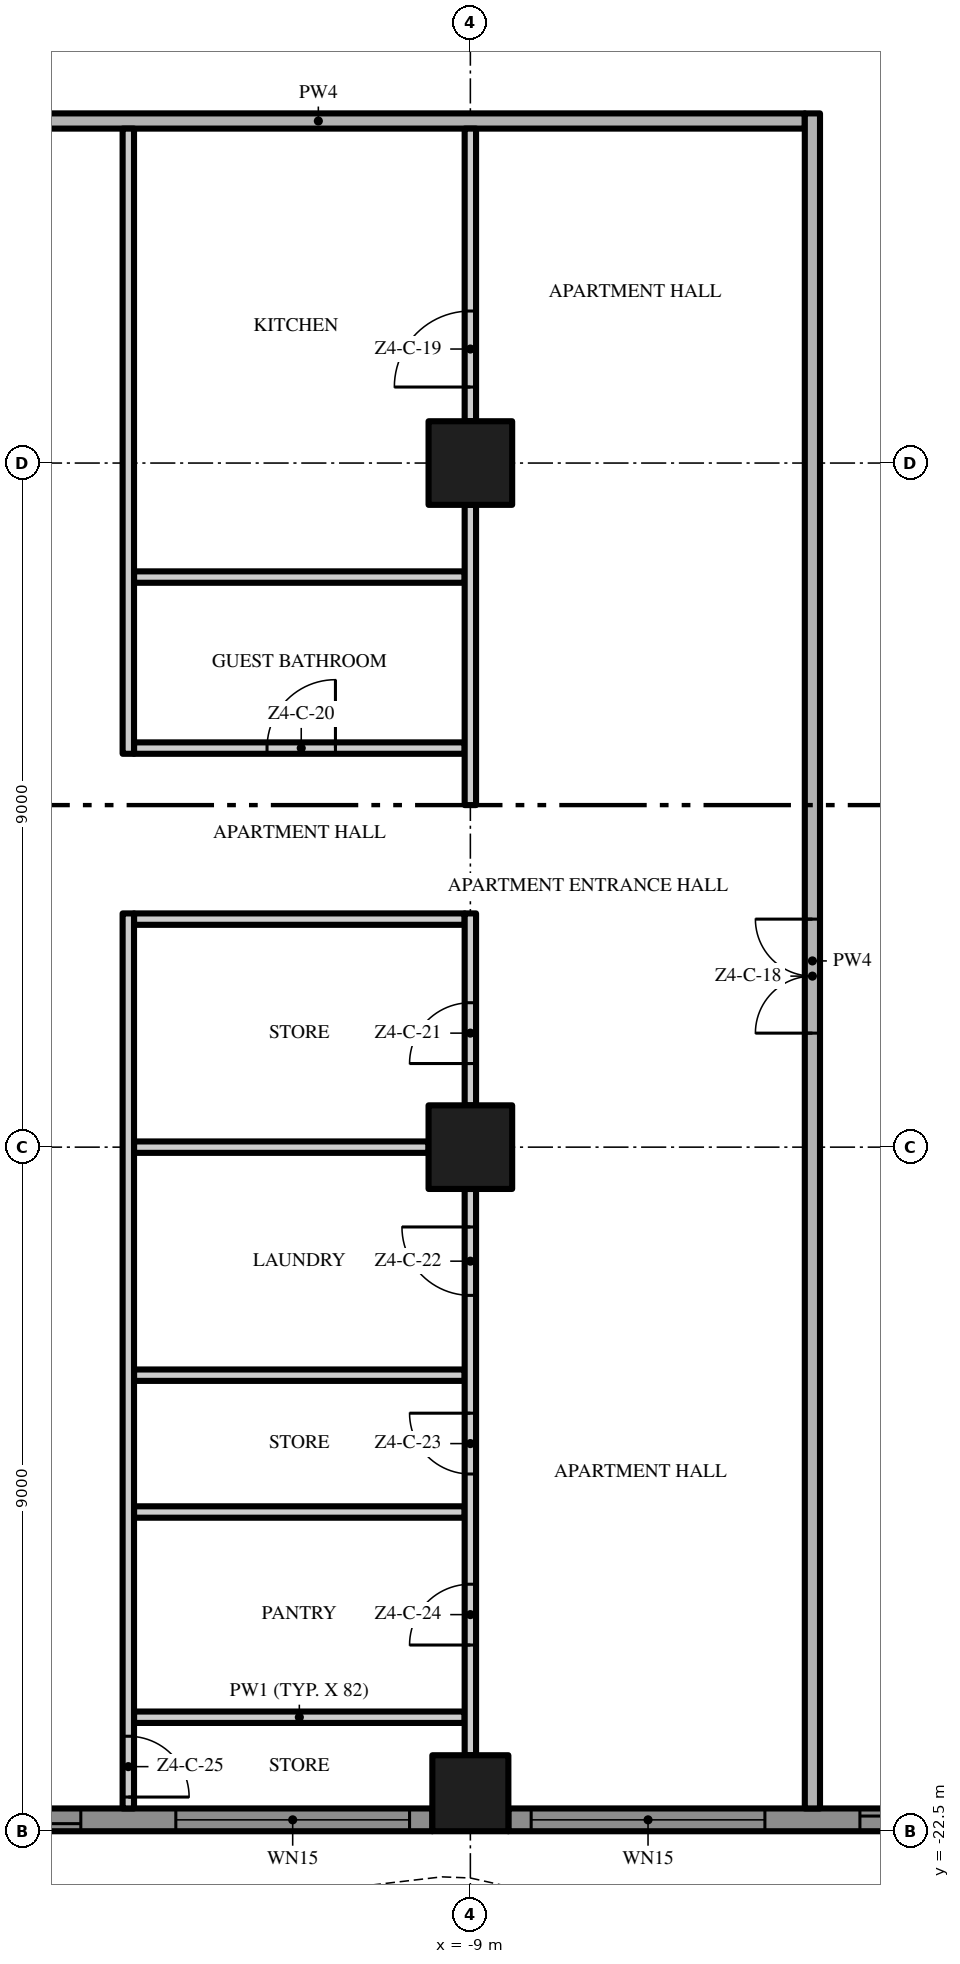
"""IFC4 building model, lengths in metres.
Left out: names, types, materials, properties, quantities, classifications, styles, units other than length and angle.
Written with IfcOpenShell. Run it as: python <this file> out.ifc"""

import sys

from ifc_helpers import new_model, si_unit, direction, frame, frame_2d, origin, origin_2d, place, context, subcontext, project, spatial, polyline, rectangle, outline, extrude, element, fill, save


model = new_model("IFC4")
c1 = context("Model", 3, precision=1e-05, world=origin(), true_north=direction((0.0, 1.0)))
c2 = subcontext(c1, "Body", "Model", "MODEL_VIEW")
j1 = project(units=[si_unit("LENGTHUNIT", "METRE"), si_unit("PLANEANGLEUNIT", "RADIAN")], contexts=[c1])
p1 = place(None, origin())
s1 = spatial("IfcSite", under=j1, at=p1, CompositionType="ELEMENT")
p2 = place(p1, origin())
s2 = spatial("IfcBuilding", under=s1, at=p2, CompositionType="ELEMENT")
p3 = place(p2, frame((0.0, 0.0, 207.2)))
s3 = spatial("IfcBuildingStorey", under=s2, at=p3, CompositionType="ELEMENT", Elevation=207.2)
p4 = place(p3, frame((-9.0, -13.5, 0.0), z_axis=(0.0, 0.0, 1.0), x_axis=(1.0, 0.0, 0.0)))
e1 = element("IfcColumn", 1, at=p4, inside=s3, PredefinedType="COLUMN", context=c2, shape_type="SweptSolid", body=[
    extrude(rectangle(XDim=1.1, YDim=1.1, at=origin_2d()), origin(), (0.0, 0.0, 1.0), 3.5),
])
p5 = place(p3, frame((-9.0, -22.0, 0.0), z_axis=(0.0, 0.0, 1.0), x_axis=(1.0, 0.0, 0.0)))
e2 = element("IfcColumn", 2, at=p5, inside=s3, PredefinedType="COLUMN", context=c2, shape_type="SweptSolid", body=[
    extrude(rectangle(XDim=1.0, YDim=1.0, at=origin_2d()), origin(), (0.0, 0.0, 1.0), 3.5),
])
p6 = place(p3, frame((-9.0, -4.5, 0.0), z_axis=(0.0, 0.0, 1.0), x_axis=(1.0, 0.0, 0.0)))
e3 = element("IfcColumn", 3, at=p6, inside=s3, PredefinedType="COLUMN", context=c2, shape_type="SweptSolid", body=[
    extrude(rectangle(XDim=1.1, YDim=1.1, at=origin_2d()), origin(), (0.0, 0.0, 1.0), 3.5),
])
p7 = place(p3, frame((-9.5, -22.35, 0.0), z_axis=(0.0, 0.0, 1.0), x_axis=(-1.0, 0.0, 0.0)))
e4 = element("IfcWall", 4, at=p7, inside=s3, PredefinedType="SOLIDWALL", context=c2, shape_type="SweptSolid", body=[
    extrude(rectangle(XDim=8.0, YDim=0.3, at=frame_2d((4.0, 0.0))), origin(), (0.0, 0.0, 1.0), 3.5),
])
p8 = place(p7, frame((4.625, 0.0, 0.0)))
e5 = element("IfcOpeningElement", 5, at=p8, cuts=e4, PredefinedType="OPENING", context=c2, shape_type="SweptSolid", body=[
    extrude(rectangle(XDim=3.075, YDim=2.4, at=frame_2d((1.538, 1.2))), frame((0.0, 0.16, 0.0), z_axis=(0.0, -1.0, 0.0), x_axis=(1.0, 0.0, 0.0)), (0.0, 0.0, 1.0), 0.32),
])
p9 = place(p7, frame((0.3, 0.0, 0.45)))
e6 = element("IfcOpeningElement", 6, at=p9, cuts=e4, PredefinedType="OPENING", context=c2, shape_type="SweptSolid", body=[
    extrude(rectangle(XDim=3.075, YDim=2.65, at=frame_2d((1.538, 1.325))), frame((0.0, 0.16, 0.0), z_axis=(0.0, -1.0, 0.0), x_axis=(1.0, 0.0, 0.0)), (0.0, 0.0, 1.0), 0.32),
])
p10 = place(p3, frame((-0.5, -22.35, 0.0), z_axis=(0.0, 0.0, 1.0), x_axis=(-1.0, 0.0, 0.0)))
e7 = element("IfcWall", 7, at=p10, inside=s3, PredefinedType="SOLIDWALL", context=c2, shape_type="SweptSolid", body=[
    extrude(rectangle(XDim=8.0, YDim=0.3, at=frame_2d((4.0, 0.0))), origin(), (0.0, 0.0, 1.0), 3.5),
])
p11 = place(p10, frame((4.625, 0.0, 0.45)))
e8 = element("IfcOpeningElement", 8, at=p11, cuts=e7, PredefinedType="OPENING", context=c2, shape_type="SweptSolid", body=[
    extrude(rectangle(XDim=3.075, YDim=2.65, at=frame_2d((1.538, 1.325))), frame((0.0, 0.16, 0.0), z_axis=(0.0, -1.0, 0.0), x_axis=(1.0, 0.0, 0.0)), (0.0, 0.0, 1.0), 0.32),
])
p12 = place(p10, frame((0.3, 0.0, 0.0)))
e9 = element("IfcOpeningElement", 9, at=p12, cuts=e7, PredefinedType="OPENING", context=c2, shape_type="SweptSolid", body=[
    extrude(rectangle(XDim=3.075, YDim=2.4, at=frame_2d((1.538, 1.2))), frame((0.0, 0.16, 0.0), z_axis=(0.0, -1.0, 0.0), x_axis=(1.0, 0.0, 0.0)), (0.0, 0.0, 1.0), 0.32),
])
p13 = place(p3, origin())
e10 = element("IfcWall", 10, at=p13, inside=s3, PredefinedType="USERDEFINED", context=c2, shape_type="SweptSolid", body=[
    extrude(outline(polyline([(-22.5, -23.451), (-21.0, -24.112), (-19.5, -24.845), (-18.0, -25.369), (-16.875, -25.5), (-16.5, -25.485), (-15.0, -25.149), (-13.5, -24.488), (-12.0, -23.755), (-10.5, -23.231), (-9.375, -23.1), (-9.0, -23.115), (-7.5, -23.451), (-6.0, -24.112), (-4.5, -24.845), (-3.0, -25.369), (-1.875, -25.5), (-1.5, -25.485), (0.0, -25.149), (1.5, -24.488), (3.0, -23.755), (4.5, -23.231), (5.625, -23.1), (6.0, -23.115), (7.5, -23.451), (9.0, -24.112), (10.5, -24.845), (12.0, -25.369), (13.125, -25.5), (13.5, -25.485), (15.0, -25.149), (16.5, -24.488), (18.0, -23.755), (19.5, -23.231), (20.625, -23.1), (21.0, -23.115), (22.5, -23.451), (22.555, -23.208), (21.033, -22.866), (20.615, -22.849), (19.444, -22.986), (17.904, -23.524), (16.395, -24.261), (14.921, -24.91), (13.467, -25.236), (13.135, -25.249), (12.056, -25.124), (10.596, -24.614), (9.105, -23.885), (7.579, -23.213), (6.033, -22.866), (5.615, -22.849), (4.444, -22.986), (2.904, -23.524), (1.395, -24.261), (-0.079, -24.91), (-1.533, -25.236), (-1.865, -25.249), (-2.944, -25.124), (-4.404, -24.614), (-5.895, -23.885), (-7.421, -23.213), (-8.967, -22.866), (-9.385, -22.849), (-10.556, -22.986), (-12.096, -23.524), (-13.605, -24.261), (-15.079, -24.91), (-16.533, -25.236), (-16.865, -25.249), (-17.944, -25.124), (-19.404, -24.614), (-20.895, -23.885), (-22.399, -23.223), (-22.5, -23.451)])), origin(), (0.0, 0.0, 1.0), 0.9),
])
for number, where, z_axis, x_axis in (
    (11, (-13.425, -21.0, 0.0), (0.0, 0.0, 1.0), (1.0, 0.0, 0.0)),
    (12, (-13.425, -18.3, 0.0), (0.0, 0.0, 1.0), (1.0, 0.0, 0.0)),
    (13, (-13.425, -16.5, 0.0), (0.0, 0.0, 1.0), (1.0, 0.0, 0.0)),
):
    element("IfcWall", number, at=place(p3, frame(where, z_axis=z_axis, x_axis=x_axis)), inside=s3, PredefinedType="PARTITIONING", context=c2, shape_type="SweptSolid", body=[
        extrude(rectangle(XDim=4.35, YDim=0.15, at=frame_2d((2.175, 0.0))), origin(), (0.0, 0.0, 1.0), 3.5),
    ])
p14 = place(p3, frame((-13.425, -13.5, 0.0), z_axis=(0.0, 0.0, 1.0), x_axis=(1.0, 0.0, 0.0)))
e14 = element("IfcWall", 14, at=p14, inside=s3, PredefinedType="PARTITIONING", context=c2, shape_type="SweptSolid", body=[
    extrude(rectangle(XDim=3.875, YDim=0.15, at=frame_2d((1.938, 0.0))), origin(), (0.0, 0.0, 1.0), 3.5),
])
p15 = place(p3, frame((-13.425, -10.5, 0.0), z_axis=(0.0, 0.0, 1.0), x_axis=(1.0, 0.0, 0.0)))
e15 = element("IfcWall", 15, at=p15, inside=s3, PredefinedType="PARTITIONING", context=c2, shape_type="SweptSolid", body=[
    extrude(rectangle(XDim=4.35, YDim=0.15, at=frame_2d((2.175, 0.0))), origin(), (0.0, 0.0, 1.0), 3.5),
])
p16 = place(p3, frame((-13.425, -8.25, 0.0), z_axis=(0.0, 0.0, 1.0), x_axis=(1.0, 0.0, 0.0)))
e16 = element("IfcWall", 16, at=p16, inside=s3, PredefinedType="PARTITIONING", context=c2, shape_type="SweptSolid", body=[
    extrude(rectangle(XDim=4.35, YDim=0.15, at=frame_2d((2.175, 0.0))), origin(), (0.0, 0.0, 1.0), 3.5),
])
p17 = place(p16, frame((1.75, 0.0, 0.0)))
e17 = element("IfcOpeningElement", 17, at=p17, cuts=e16, PredefinedType="OPENING", context=c2, shape_type="SweptSolid", body=[
    extrude(rectangle(XDim=0.9, YDim=2.1, at=frame_2d((0.45, 1.05))), frame((0.0, 0.085, 0.0), z_axis=(0.0, -1.0, 0.0), x_axis=(1.0, 0.0, 0.0)), (0.0, 0.0, 1.0), 0.17),
])
p18 = place(p3, frame((-13.425, -6.0, 0.0), z_axis=(0.0, 0.0, 1.0), x_axis=(1.0, 0.0, 0.0)))
e18 = element("IfcWall", 18, at=p18, inside=s3, PredefinedType="PARTITIONING", context=c2, shape_type="SweptSolid", body=[
    extrude(rectangle(XDim=4.35, YDim=0.15, at=frame_2d((2.175, 0.0))), origin(), (0.0, 0.0, 1.0), 3.5),
])
p19 = place(p3, frame((-17.4, 0.0, 0.0), z_axis=(0.0, 0.0, 1.0), x_axis=(1.0, 0.0, 0.0)))
e19 = element("IfcWall", 19, at=p19, inside=s3, PredefinedType="PARTITIONING", context=c2, shape_type="SweptSolid", body=[
    extrude(rectangle(XDim=12.8, YDim=0.2, at=frame_2d((6.4, 0.0))), origin(), (0.0, 0.0, 1.0), 3.5),
])
p20 = place(p3, frame((-13.5, -10.425, 0.0), z_axis=(0.0, 0.0, 1.0), x_axis=(0.0, -1.0, 0.0)))
e20 = element("IfcWall", 20, at=p20, inside=s3, PredefinedType="PARTITIONING", context=c2, shape_type="SweptSolid", body=[
    extrude(rectangle(XDim=11.775, YDim=0.15, at=frame_2d((5.888, 0.0))), origin(), (0.0, 0.0, 1.0), 3.5),
])
p21 = place(p20, frame((10.825, 0.0, 0.0)))
e21 = element("IfcOpeningElement", 21, at=p21, cuts=e20, PredefinedType="OPENING", context=c2, shape_type="SweptSolid", body=[
    extrude(rectangle(XDim=0.8, YDim=2.0, at=frame_2d((0.4, 1.0))), frame((0.0, 0.085, 0.0), z_axis=(0.0, -1.0, 0.0), x_axis=(1.0, 0.0, 0.0)), (0.0, 0.0, 1.0), 0.17),
])
p22 = place(p3, frame((-13.5, -8.325, 0.0), z_axis=(0.0, 0.0, 1.0), x_axis=(0.0, 1.0, 0.0)))
e22 = element("IfcWall", 22, at=p22, inside=s3, PredefinedType="PARTITIONING", context=c2, shape_type="SweptSolid", body=[
    extrude(rectangle(XDim=8.225, YDim=0.15, at=frame_2d((4.112, 0.0))), origin(), (0.0, 0.0, 1.0), 3.5),
])
p23 = place(p3, frame((-9.0, -21.5, 0.0), z_axis=(0.0, 0.0, 1.0), x_axis=(0.0, 1.0, 0.0)))
e23 = element("IfcWall", 23, at=p23, inside=s3, PredefinedType="PARTITIONING", context=c2, shape_type="SweptSolid", body=[
    extrude(rectangle(XDim=7.45, YDim=0.15, at=frame_2d((3.725, 0.0))), origin(), (0.0, 0.0, 1.0), 3.5),
])
p24 = place(p23, frame((6.05, 0.0, 0.0)))
e24 = element("IfcOpeningElement", 24, at=p24, cuts=e23, PredefinedType="OPENING", context=c2, shape_type="SweptSolid", body=[
    extrude(rectangle(XDim=0.9, YDim=2.1, at=frame_2d((0.45, 1.05))), frame((0.0, 0.085, 0.0), z_axis=(0.0, -1.0, 0.0), x_axis=(1.0, 0.0, 0.0)), (0.0, 0.0, 1.0), 0.17),
])
p25 = place(p23, frame((3.7, 0.0, 0.0)))
e25 = element("IfcOpeningElement", 25, at=p25, cuts=e23, PredefinedType="OPENING", context=c2, shape_type="SweptSolid", body=[
    extrude(rectangle(XDim=0.8, YDim=2.0, at=frame_2d((0.4, 1.0))), frame((0.0, 0.085, 0.0), z_axis=(0.0, -1.0, 0.0), x_axis=(1.0, 0.0, 0.0)), (0.0, 0.0, 1.0), 0.17),
])
p26 = place(p23, frame((1.45, 0.0, 0.0)))
e26 = element("IfcOpeningElement", 26, at=p26, cuts=e23, PredefinedType="OPENING", context=c2, shape_type="SweptSolid", body=[
    extrude(rectangle(XDim=0.8, YDim=2.0, at=frame_2d((0.4, 1.0))), frame((0.0, 0.085, 0.0), z_axis=(0.0, -1.0, 0.0), x_axis=(1.0, 0.0, 0.0)), (0.0, 0.0, 1.0), 0.17),
])
p27 = place(p3, frame((-9.0, -12.95, 0.0), z_axis=(0.0, 0.0, 1.0), x_axis=(0.0, 1.0, 0.0)))
e27 = element("IfcWall", 27, at=p27, inside=s3, PredefinedType="PARTITIONING", context=c2, shape_type="SweptSolid", body=[
    extrude(rectangle(XDim=2.525, YDim=0.15, at=frame_2d((1.262, 0.0))), origin(), (0.0, 0.0, 1.0), 3.5),
])
p28 = place(p27, frame((0.55, 0.0, 0.0)))
e28 = element("IfcOpeningElement", 28, at=p28, cuts=e27, PredefinedType="OPENING", context=c2, shape_type="SweptSolid", body=[
    extrude(rectangle(XDim=0.8, YDim=2.0, at=frame_2d((0.4, 1.0))), frame((0.0, 0.085, 0.0), z_axis=(0.0, -1.0, 0.0), x_axis=(1.0, 0.0, 0.0)), (0.0, 0.0, 1.0), 0.17),
])
p29 = place(p3, frame((-9.0, -9.0, 0.0), z_axis=(0.0, 0.0, 1.0), x_axis=(0.0, 1.0, 0.0)))
e29 = element("IfcWall", 29, at=p29, inside=s3, PredefinedType="PARTITIONING", context=c2, shape_type="SweptSolid", body=[
    extrude(rectangle(XDim=3.95, YDim=0.15, at=frame_2d((1.975, 0.0))), origin(), (0.0, 0.0, 1.0), 3.5),
])
p30 = place(p3, frame((-9.0, -3.95, 0.0), z_axis=(0.0, 0.0, 1.0), x_axis=(0.0, 1.0, 0.0)))
e30 = element("IfcWall", 30, at=p30, inside=s3, PredefinedType="PARTITIONING", context=c2, shape_type="SweptSolid", body=[
    extrude(rectangle(XDim=3.85, YDim=0.15, at=frame_2d((1.925, 0.0))), origin(), (0.0, 0.0, 1.0), 3.5),
])
p31 = place(p30, frame((0.45, 0.0, 0.0)))
e31 = element("IfcOpeningElement", 31, at=p31, cuts=e30, PredefinedType="OPENING", context=c2, shape_type="SweptSolid", body=[
    extrude(rectangle(XDim=1.0, YDim=2.4, at=frame_2d((0.5, 1.2))), frame((0.0, 0.085, 0.0), z_axis=(0.0, -1.0, 0.0), x_axis=(1.0, 0.0, 0.0)), (0.0, 0.0, 1.0), 0.17),
])
p32 = place(p3, frame((-4.5, -22.2, 0.0), z_axis=(0.0, 0.0, 1.0), x_axis=(0.0, 1.0, 0.0)))
e32 = element("IfcWall", 32, at=p32, inside=s3, PredefinedType="PARTITIONING", context=c2, shape_type="SweptSolid", body=[
    extrude(rectangle(XDim=22.3, YDim=0.2, at=frame_2d((11.15, 0.0))), origin(), (0.0, 0.0, 1.0), 3.5),
])
p33 = place(p32, frame((10.2, 0.0, 0.0)))
e33 = element("IfcOpeningElement", 33, at=p33, cuts=e32, PredefinedType="OPENING", context=c2, shape_type="SweptSolid", body=[
    extrude(rectangle(XDim=1.5, YDim=2.4, at=frame_2d((0.75, 1.2))), frame((0.0, 0.11, 0.0), z_axis=(0.0, -1.0, 0.0), x_axis=(1.0, 0.0, 0.0)), (0.0, 0.0, 1.0), 0.22),
])
p34 = place(p8, origin())
e34 = element("IfcDoor", 34, at=p34, inside=s3, OperationType="SINGLE_SWING_LEFT", PredefinedType="DOOR", context=c2, shape_type="SweptSolid", body=[
    extrude(rectangle(XDim=3.075, YDim=2.4, at=frame_2d((1.538, 1.2))), frame((0.0, 0.025, 0.0), z_axis=(0.0, -1.0, 0.0), x_axis=(1.0, 0.0, 0.0)), (0.0, 0.0, 1.0), 0.05),
])
fill(e5, e34)
p35 = place(p9, origin())
e35 = element("IfcWindow", 35, at=p35, inside=s3, PartitioningType="SINGLE_PANEL", PredefinedType="WINDOW", context=c2, shape_type="SweptSolid", body=[
    extrude(rectangle(XDim=3.075, YDim=2.65, at=frame_2d((1.538, 1.325))), frame((0.0, 0.03, 0.0), z_axis=(0.0, -1.0, 0.0), x_axis=(1.0, 0.0, 0.0)), (0.0, 0.0, 1.0), 0.06),
])
fill(e6, e35)
p36 = place(p11, origin())
e36 = element("IfcWindow", 36, at=p36, inside=s3, PartitioningType="SINGLE_PANEL", PredefinedType="WINDOW", context=c2, shape_type="SweptSolid", body=[
    extrude(rectangle(XDim=3.075, YDim=2.65, at=frame_2d((1.538, 1.325))), frame((0.0, 0.03, 0.0), z_axis=(0.0, -1.0, 0.0), x_axis=(1.0, 0.0, 0.0)), (0.0, 0.0, 1.0), 0.06),
])
fill(e8, e36)
p37 = place(p12, origin())
e37 = element("IfcDoor", 37, at=p37, inside=s3, OperationType="SINGLE_SWING_LEFT", PredefinedType="DOOR", context=c2, shape_type="SweptSolid", body=[
    extrude(rectangle(XDim=3.075, YDim=2.4, at=frame_2d((1.538, 1.2))), frame((0.0, 0.025, 0.0), z_axis=(0.0, -1.0, 0.0), x_axis=(1.0, 0.0, 0.0)), (0.0, 0.0, 1.0), 0.05),
])
fill(e9, e37)
p38 = place(p33, origin())
e38 = element("IfcDoor", 38, at=p38, inside=s3, OperationType="DOUBLE_DOOR_SINGLE_SWING", PredefinedType="DOOR", context=c2, shape_type="SweptSolid", body=[
    extrude(rectangle(XDim=1.5, YDim=2.4, at=frame_2d((0.75, 1.2))), frame((0.0, 0.025, 0.0), z_axis=(0.0, -1.0, 0.0), x_axis=(1.0, 0.0, 0.0)), (0.0, 0.0, 1.0), 0.05),
])
fill(e33, e38)
p39 = place(p31, origin())
e39 = element("IfcDoor", 39, at=p39, inside=s3, OperationType="SINGLE_SWING_LEFT", PredefinedType="DOOR", context=c2, shape_type="SweptSolid", body=[
    extrude(rectangle(XDim=1.0, YDim=2.4, at=frame_2d((0.5, 1.2))), frame((0.0, 0.025, 0.0), z_axis=(0.0, -1.0, 0.0), x_axis=(1.0, 0.0, 0.0)), (0.0, 0.0, 1.0), 0.05),
])
fill(e31, e39)
p40 = place(p17, origin())
e40 = element("IfcDoor", 40, at=p40, inside=s3, OperationType="SINGLE_SWING_RIGHT", PredefinedType="DOOR", context=c2, shape_type="SweptSolid", body=[
    extrude(rectangle(XDim=0.9, YDim=2.1, at=frame_2d((0.45, 1.05))), frame((0.0, 0.025, 0.0), z_axis=(0.0, -1.0, 0.0), x_axis=(1.0, 0.0, 0.0)), (0.0, 0.0, 1.0), 0.05),
])
fill(e17, e40)
p41 = place(p28, origin())
e41 = element("IfcDoor", 41, at=p41, inside=s3, OperationType="SINGLE_SWING_LEFT", PredefinedType="DOOR", context=c2, shape_type="SweptSolid", body=[
    extrude(rectangle(XDim=0.8, YDim=2.0, at=frame_2d((0.4, 1.0))), frame((0.0, 0.025, 0.0), z_axis=(0.0, -1.0, 0.0), x_axis=(1.0, 0.0, 0.0)), (0.0, 0.0, 1.0), 0.05),
])
fill(e28, e41)
p42 = place(p24, origin())
e42 = element("IfcDoor", 42, at=p42, inside=s3, OperationType="SINGLE_SWING_RIGHT", PredefinedType="DOOR", context=c2, shape_type="SweptSolid", body=[
    extrude(rectangle(XDim=0.9, YDim=2.1, at=frame_2d((0.45, 1.05))), frame((0.0, 0.025, 0.0), z_axis=(0.0, -1.0, 0.0), x_axis=(1.0, 0.0, 0.0)), (0.0, 0.0, 1.0), 0.05),
])
fill(e24, e42)
p43 = place(p25, origin())
e43 = element("IfcDoor", 43, at=p43, inside=s3, OperationType="SINGLE_SWING_RIGHT", PredefinedType="DOOR", context=c2, shape_type="SweptSolid", body=[
    extrude(rectangle(XDim=0.8, YDim=2.0, at=frame_2d((0.4, 1.0))), frame((0.0, 0.025, 0.0), z_axis=(0.0, -1.0, 0.0), x_axis=(1.0, 0.0, 0.0)), (0.0, 0.0, 1.0), 0.05),
])
fill(e25, e43)
p44 = place(p26, origin())
e44 = element("IfcDoor", 44, at=p44, inside=s3, OperationType="SINGLE_SWING_LEFT", PredefinedType="DOOR", context=c2, shape_type="SweptSolid", body=[
    extrude(rectangle(XDim=0.8, YDim=2.0, at=frame_2d((0.4, 1.0))), frame((0.0, 0.025, 0.0), z_axis=(0.0, -1.0, 0.0), x_axis=(1.0, 0.0, 0.0)), (0.0, 0.0, 1.0), 0.05),
])
fill(e26, e44)
p45 = place(p21, origin())
e45 = element("IfcDoor", 45, at=p45, inside=s3, OperationType="SINGLE_SWING_RIGHT", PredefinedType="DOOR", context=c2, shape_type="SweptSolid", body=[
    extrude(rectangle(XDim=0.8, YDim=2.0, at=frame_2d((0.4, 1.0))), frame((0.0, 0.025, 0.0), z_axis=(0.0, -1.0, 0.0), x_axis=(1.0, 0.0, 0.0)), (0.0, 0.0, 1.0), 0.05),
])
fill(e21, e45)
save(model, sys.argv[1])
